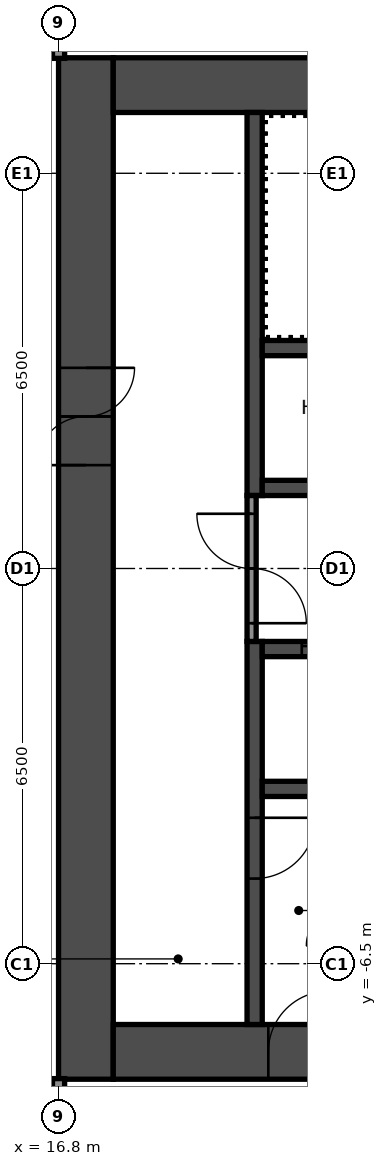
"""IFC4 building model, lengths in metres.
Left out: names, types, materials, properties, quantities, classifications, styles, units other than length and angle.
Written with IfcOpenShell. Run it as: python <this file> out.ifc"""

import sys

from ifc_helpers import new_model, si_unit, direction, frame, frame_2d, origin, place, context, subcontext, project, spatial, rectangle, extrude, element, fill, save


model = new_model("IFC4")
c1 = context("Model", 3, precision=1e-05, world=origin(), true_north=direction((0.0, 1.0)))
c2 = subcontext(c1, "Body", "Model", "MODEL_VIEW")
j1 = project(units=[si_unit("LENGTHUNIT", "METRE"), si_unit("PLANEANGLEUNIT", "RADIAN")], contexts=[c1])
p1 = place(None, origin())
s1 = spatial("IfcSite", under=j1, at=p1, CompositionType="ELEMENT")
p2 = place(p1, origin())
s2 = spatial("IfcBuilding", under=s1, at=p2, CompositionType="ELEMENT")
p3 = place(p2, frame((0.0, 0.0, 180.2)))
s3 = spatial("IfcBuildingStorey", under=s2, at=p3, CompositionType="ELEMENT", Elevation=180.2)
p4 = place(p3, frame((17.25, -8.4, 0.0), z_axis=(0.0, 0.0, 1.0), x_axis=(0.0, 1.0, 0.0)))
e1 = element("IfcWall", 1, at=p4, inside=s3, PredefinedType="SHEAR", context=c2, shape_type="SweptSolid", body=[
    extrude(rectangle(XDim=16.8, YDim=0.9, at=frame_2d((8.4, 0.0))), origin(), (0.0, 0.0, 1.0), 5.95),
])
p5 = place(p4, frame((10.1, 0.0, 0.0)))
e2 = element("IfcOpeningElement", 2, at=p5, cuts=e1, PredefinedType="OPENING", context=c2, shape_type="SweptSolid", body=[
    extrude(rectangle(XDim=1.6, YDim=2.1, at=frame_2d((0.8, 1.05))), frame((0.0, 0.46, 0.0), z_axis=(0.0, -1.0, 0.0), x_axis=(1.0, 0.0, 0.0)), (0.0, 0.0, 1.0), 0.92),
])
p6 = place(p3, frame((17.7, 7.95, 0.0), z_axis=(0.0, 0.0, 1.0), x_axis=(1.0, 0.0, 0.0)))
e3 = element("IfcWall", 3, at=p6, inside=s3, PredefinedType="SHEAR", context=c2, shape_type="SweptSolid", body=[
    extrude(rectangle(XDim=15.0, YDim=0.9, at=frame_2d((7.5, 0.0))), origin(), (0.0, 0.0, 1.0), 5.95),
])
p7 = place(p6, frame((10.4, 0.0, 0.0)))
e4 = element("IfcOpeningElement", 4, at=p7, cuts=e3, PredefinedType="OPENING", context=c2, shape_type="SweptSolid", body=[
    extrude(rectangle(XDim=1.2, YDim=2.1, at=frame_2d((0.6, 1.05))), frame((0.0, 0.46, 0.0), z_axis=(0.0, -1.0, 0.0), x_axis=(1.0, 0.0, 0.0)), (0.0, 0.0, 1.0), 0.92),
])
p8 = place(p6, frame((13.35, 0.0, 0.0)))
e5 = element("IfcOpeningElement", 5, at=p8, cuts=e3, PredefinedType="OPENING", context=c2, shape_type="SweptSolid", body=[
    extrude(rectangle(XDim=0.9, YDim=2.1, at=frame_2d((0.45, 1.05))), frame((0.0, 0.46, 0.0), z_axis=(0.0, -1.0, 0.0), x_axis=(1.0, 0.0, 0.0)), (0.0, 0.0, 1.0), 0.92),
])
p9 = place(p3, frame((17.7, -7.95, 0.0), z_axis=(0.0, 0.0, 1.0), x_axis=(1.0, 0.0, 0.0)))
e6 = element("IfcWall", 6, at=p9, inside=s3, PredefinedType="SHEAR", context=c2, shape_type="SweptSolid", body=[
    extrude(rectangle(XDim=15.0, YDim=0.9, at=frame_2d((7.5, 0.0))), origin(), (0.0, 0.0, 1.0), 5.95),
])
p10 = place(p9, frame((2.55, 0.0, 0.0)))
e7 = element("IfcOpeningElement", 7, at=p10, cuts=e6, PredefinedType="OPENING", context=c2, shape_type="SweptSolid", body=[
    extrude(rectangle(XDim=1.0, YDim=2.1, at=frame_2d((0.5, 1.05))), frame((0.0, 0.46, 0.0), z_axis=(0.0, -1.0, 0.0), x_axis=(1.0, 0.0, 0.0)), (0.0, 0.0, 1.0), 0.92),
])
p11 = place(p3, frame((20.025, 1.2, 0.0), z_axis=(0.0, 0.0, 1.0), x_axis=(0.0, 1.0, 0.0)))
e8 = element("IfcWall", 8, at=p11, inside=s3, PredefinedType="SHEAR", context=c2, shape_type="SweptSolid", body=[
    extrude(rectangle(XDim=6.3, YDim=0.25, at=frame_2d((3.15, 0.0))), origin(), (0.0, 0.0, 1.0), 5.95),
])
p12 = place(p3, frame((20.025, -7.5, 0.0), z_axis=(0.0, 0.0, 1.0), x_axis=(0.0, 1.0, 0.0)))
e9 = element("IfcWall", 9, at=p12, inside=s3, PredefinedType="SHEAR", context=c2, shape_type="SweptSolid", body=[
    extrude(rectangle(XDim=6.3, YDim=0.25, at=frame_2d((3.15, 0.0))), origin(), (0.0, 0.0, 1.0), 5.95),
])
p13 = place(p12, frame((2.4, 0.0, 0.0)))
e10 = element("IfcOpeningElement", 10, at=p13, cuts=e9, PredefinedType="OPENING", context=c2, shape_type="SweptSolid", body=[
    extrude(rectangle(XDim=1.0, YDim=2.1, at=frame_2d((0.5, 1.05))), frame((0.0, 0.135, 0.0), z_axis=(0.0, -1.0, 0.0), x_axis=(1.0, 0.0, 0.0)), (0.0, 0.0, 1.0), 0.27),
])
p14 = place(p3, frame((20.15, 1.325, 0.0), z_axis=(0.0, 0.0, 1.0), x_axis=(1.0, 0.0, 0.0)))
e11 = element("IfcWall", 11, at=p14, inside=s3, PredefinedType="SHEAR", context=c2, shape_type="SweptSolid", body=[
    extrude(rectangle(XDim=7.5, YDim=0.25, at=frame_2d((3.75, 0.0))), origin(), (0.0, 0.0, 1.0), 5.95),
])
p15 = place(p14, frame((2.038, 0.0, 0.0)))
e12 = element("IfcOpeningElement", 12, at=p15, cuts=e11, PredefinedType="OPENING", context=c2, shape_type="SweptSolid", body=[
    extrude(rectangle(XDim=0.9, YDim=2.1, at=frame_2d((0.45, 1.05))), frame((0.0, 0.135, 0.0), z_axis=(0.0, -1.0, 0.0), x_axis=(1.0, 0.0, 0.0)), (0.0, 0.0, 1.0), 0.27),
])
p16 = place(p14, frame((5.738, 0.0, 0.0)))
e13 = element("IfcOpeningElement", 13, at=p16, cuts=e11, PredefinedType="OPENING", context=c2, shape_type="SweptSolid", body=[
    extrude(rectangle(XDim=0.9, YDim=2.1, at=frame_2d((0.45, 1.05))), frame((0.0, 0.135, 0.0), z_axis=(0.0, -1.0, 0.0), x_axis=(1.0, 0.0, 0.0)), (0.0, 0.0, 1.0), 0.27),
])
p17 = place(p3, frame((20.15, 3.625, 0.0), z_axis=(0.0, 0.0, 1.0), x_axis=(1.0, 0.0, 0.0)))
e14 = element("IfcWall", 14, at=p17, inside=s3, PredefinedType="SHEAR", context=c2, shape_type="SweptSolid", body=[
    extrude(rectangle(XDim=7.5, YDim=0.25, at=frame_2d((3.75, 0.0))), origin(), (0.0, 0.0, 1.0), 5.95),
])
p18 = place(p3, frame((20.15, -1.325, 0.0), z_axis=(0.0, 0.0, 1.0), x_axis=(1.0, 0.0, 0.0)))
e15 = element("IfcWall", 15, at=p18, inside=s3, PredefinedType="SHEAR", context=c2, shape_type="SweptSolid", body=[
    extrude(rectangle(XDim=7.5, YDim=0.25, at=frame_2d((3.75, 0.0))), origin(), (0.0, 0.0, 1.0), 5.95),
])
p19 = place(p18, frame((0.65, 0.0, 0.0)))
e16 = element("IfcOpeningElement", 16, at=p19, cuts=e15, PredefinedType="OPENING", context=c2, shape_type="SweptSolid", body=[
    extrude(rectangle(XDim=1.1, YDim=2.1, at=frame_2d((0.55, 1.05))), frame((0.0, 0.135, 0.0), z_axis=(0.0, -1.0, 0.0), x_axis=(1.0, 0.0, 0.0)), (0.0, 0.0, 1.0), 0.27),
])
p20 = place(p18, frame((3.05, 0.0, 0.0)))
e17 = element("IfcOpeningElement", 17, at=p20, cuts=e15, PredefinedType="OPENING", context=c2, shape_type="SweptSolid", body=[
    extrude(rectangle(XDim=1.1, YDim=2.1, at=frame_2d((0.55, 1.05))), frame((0.0, 0.135, 0.0), z_axis=(0.0, -1.0, 0.0), x_axis=(1.0, 0.0, 0.0)), (0.0, 0.0, 1.0), 0.27),
])
p21 = place(p18, frame((5.45, 0.0, 0.0)))
e18 = element("IfcOpeningElement", 18, at=p21, cuts=e15, PredefinedType="OPENING", context=c2, shape_type="SweptSolid", body=[
    extrude(rectangle(XDim=1.1, YDim=2.1, at=frame_2d((0.55, 1.05))), frame((0.0, 0.135, 0.0), z_axis=(0.0, -1.0, 0.0), x_axis=(1.0, 0.0, 0.0)), (0.0, 0.0, 1.0), 0.27),
])
p22 = place(p3, frame((20.15, -3.625, 0.0), z_axis=(0.0, 0.0, 1.0), x_axis=(1.0, 0.0, 0.0)))
e19 = element("IfcWall", 19, at=p22, inside=s3, PredefinedType="SHEAR", context=c2, shape_type="SweptSolid", body=[
    extrude(rectangle(XDim=7.5, YDim=0.25, at=frame_2d((3.75, 0.0))), origin(), (0.0, 0.0, 1.0), 5.95),
])
p23 = place(p3, frame((19.975, -1.2, 0.0), z_axis=(0.0, 0.0, 1.0), x_axis=(0.0, 1.0, 0.0)))
e20 = element("IfcWall", 20, at=p23, inside=s3, PredefinedType="PARTITIONING", context=c2, shape_type="SweptSolid", body=[
    extrude(rectangle(XDim=2.4, YDim=0.15, at=frame_2d((1.2, 0.0))), origin(), (0.0, 0.0, 1.0), 5.95),
])
p24 = place(p23, frame((0.3, 0.0, 0.0)))
e21 = element("IfcOpeningElement", 21, at=p24, cuts=e20, PredefinedType="OPENING", context=c2, shape_type="SweptSolid", body=[
    extrude(rectangle(XDim=1.8, YDim=2.1, at=frame_2d((0.9, 1.05))), frame((0.0, 0.085, 0.0), z_axis=(0.0, -1.0, 0.0), x_axis=(1.0, 0.0, 0.0)), (0.0, 0.0, 1.0), 0.17),
])
p25 = place(p3, frame((16.8, -15.55, 0.0), z_axis=(0.0, 0.0, 1.0), x_axis=(0.0, 1.0, 0.0)))
e22 = element("IfcWall", 22, at=p25, inside=s3, PredefinedType="PARTITIONING", context=c2, shape_type="SweptSolid", body=[
    extrude(rectangle(XDim=7.16, YDim=0.2, at=frame_2d((3.58, 0.0))), origin(), (0.0, 0.0, 1.0), 5.95),
])
p26 = place(p3, frame((16.8, 8.39, 0.0), z_axis=(0.0, 0.0, 1.0), x_axis=(0.0, 1.0, 0.0)))
e23 = element("IfcWall", 23, at=p26, inside=s3, PredefinedType="PARTITIONING", context=c2, shape_type="SweptSolid", body=[
    extrude(rectangle(XDim=12.16, YDim=0.2, at=frame_2d((6.08, 0.0))), origin(), (0.0, 0.0, 1.0), 5.95),
])
p27 = place(p5, origin())
e24 = element("IfcDoor", 24, at=p27, inside=s3, OperationType="DOUBLE_DOOR_SINGLE_SWING", PredefinedType="DOOR", context=c2, shape_type="SweptSolid", body=[
    extrude(rectangle(XDim=1.6, YDim=2.1, at=frame_2d((0.8, 1.05))), frame((0.0, 0.025, 0.0), z_axis=(0.0, -1.0, 0.0), x_axis=(1.0, 0.0, 0.0)), (0.0, 0.0, 1.0), 0.05),
])
fill(e2, e24)
p28 = place(p10, origin())
e25 = element("IfcDoor", 25, at=p28, inside=s3, OperationType="SINGLE_SWING_LEFT", PredefinedType="DOOR", context=c2, shape_type="SweptSolid", body=[
    extrude(rectangle(XDim=1.0, YDim=2.1, at=frame_2d((0.5, 1.05))), frame((0.0, 0.025, 0.0), z_axis=(0.0, -1.0, 0.0), x_axis=(1.0, 0.0, 0.0)), (0.0, 0.0, 1.0), 0.05),
])
fill(e7, e25)
p29 = place(p13, origin())
e26 = element("IfcDoor", 26, at=p29, inside=s3, OperationType="SINGLE_SWING_RIGHT", PredefinedType="DOOR", context=c2, shape_type="SweptSolid", body=[
    extrude(rectangle(XDim=1.0, YDim=2.1, at=frame_2d((0.5, 1.05))), frame((0.0, 0.025, 0.0), z_axis=(0.0, -1.0, 0.0), x_axis=(1.0, 0.0, 0.0)), (0.0, 0.0, 1.0), 0.05),
])
fill(e10, e26)
p30 = place(p24, origin())
e27 = element("IfcDoor", 27, at=p30, inside=s3, OperationType="DOUBLE_DOOR_SINGLE_SWING", PredefinedType="DOOR", context=c2, shape_type="SweptSolid", body=[
    extrude(rectangle(XDim=1.8, YDim=2.1, at=frame_2d((0.9, 1.05))), frame((0.0, 0.025, 0.0), z_axis=(0.0, -1.0, 0.0), x_axis=(1.0, 0.0, 0.0)), (0.0, 0.0, 1.0), 0.05),
])
fill(e21, e27)
p31 = place(p19, origin())
e28 = element("IfcDoor", 28, at=p31, inside=s3, OperationType="DOUBLE_DOOR_SLIDING", PredefinedType="DOOR", context=c2, shape_type="SweptSolid", body=[
    extrude(rectangle(XDim=1.1, YDim=2.1, at=frame_2d((0.55, 1.05))), frame((0.0, 0.025, 0.0), z_axis=(0.0, -1.0, 0.0), x_axis=(1.0, 0.0, 0.0)), (0.0, 0.0, 1.0), 0.05),
])
fill(e16, e28)
save(model, sys.argv[1])
